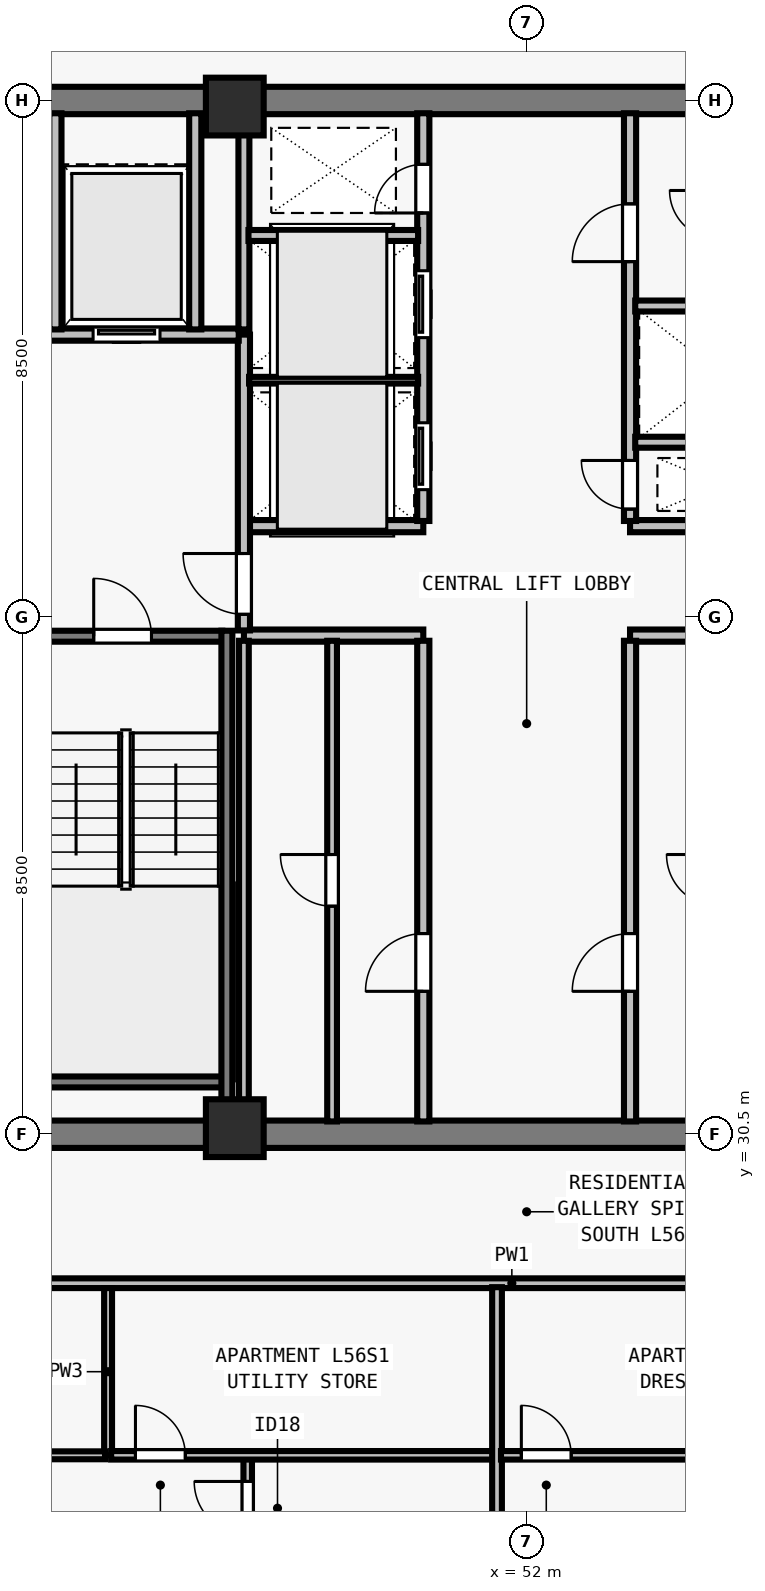
"""IFC4 building model, lengths in metres.
Left out: names, types, materials, properties, quantities, classifications, styles, units other than length and angle.
Written with IfcOpenShell. Run it as: python <this file> out.ifc"""

import sys

from ifc_helpers import new_model, si_unit, direction, frame, frame_2d, origin, origin_2d, place, context, subcontext, project, spatial, rectangle, extrude, element, fill, save


model = new_model("IFC4")
c1 = context("Model", 3, precision=1e-05, world=origin(), true_north=direction((0.0, 1.0)))
c2 = subcontext(c1, "Body", "Model", "MODEL_VIEW")
j1 = project(units=[si_unit("LENGTHUNIT", "METRE"), si_unit("PLANEANGLEUNIT", "RADIAN")], contexts=[c1])
p1 = place(None, origin())
s1 = spatial("IfcSite", under=j1, at=p1, CompositionType="ELEMENT")
p2 = place(p1, origin())
s2 = spatial("IfcBuilding", under=s1, at=p2, CompositionType="ELEMENT")
p3 = place(p2, frame((0.0, 0.0, 206.0)))
s3 = spatial("IfcBuildingStorey", under=s2, at=p3, CompositionType="ELEMENT", Elevation=206.0)
for number, where, z_axis, x_axis in (
    (1, (47.2, 30.6, 0.0), (0.0, 0.0, 1.0), (1.0, 0.0, 0.0)),
    (2, (47.2, 47.4, 0.0), (0.0, 0.0, 1.0), (1.0, 0.0, 0.0)),
):
    element("IfcColumn", number, at=place(p3, frame(where, z_axis=z_axis, x_axis=x_axis)), inside=s3, PredefinedType="COLUMN", context=c2, shape_type="SweptSolid", body=[
        extrude(rectangle(XDim=0.95, YDim=0.95, at=origin_2d()), origin(), (0.0, 0.0, 1.0), 3.5),
    ])
for number, where, z_axis, x_axis in (
    (3, (43.275, 30.5, 0.0), (0.0, 0.0, 1.0), (1.0, 0.0, 0.0)),
    (4, (43.275, 47.5, 0.0), (0.0, 0.0, 1.0), (1.0, 0.0, 0.0)),
):
    element("IfcWall", number, at=place(p3, frame(where, z_axis=z_axis, x_axis=x_axis)), inside=s3, PredefinedType="SHEAR", context=c2, shape_type="SweptSolid", body=[
        extrude(rectangle(XDim=17.45, YDim=0.45, at=frame_2d((8.725, 0.0))), origin(), (0.0, 0.0, 1.0), 3.29),
    ])
for number, where, z_axis, x_axis in (
    (5, (47.35, 38.7, 0.0), (0.0, 0.0, 1.0), (1.0, 0.0, 0.0)),
    (6, (47.35, 40.5, 0.0), (0.0, 0.0, 1.0), (1.0, 0.0, 0.0)),
    (7, (53.7, 38.7, 0.0), (0.0, 0.0, 1.0), (1.0, 0.0, 0.0)),
    (8, (53.7, 40.5, 0.0), (0.0, 0.0, 1.0), (1.0, 0.0, 0.0)),
):
    element("IfcWall", number, at=place(p3, frame(where, z_axis=z_axis, x_axis=x_axis)), inside=s3, PredefinedType="SOLIDWALL", context=c2, shape_type="SweptSolid", body=[
        extrude(rectangle(XDim=2.95, YDim=0.2, at=frame_2d((1.475, 0.0))), origin(), (0.0, 0.0, 1.0), 3.29),
    ])
p4 = place(p3, frame((50.3, 30.71, 0.0), z_axis=(0.0, 0.0, 1.0), x_axis=(0.0, 1.0, 0.0)))
e9 = element("IfcWall", 9, at=p4, inside=s3, PredefinedType="SOLIDWALL", context=c2, shape_type="SweptSolid", body=[
    extrude(rectangle(XDim=7.905, YDim=0.2, at=frame_2d((3.953, 0.0))), origin(), (0.0, 0.0, 1.0), 3.29),
])
p5 = place(p4, frame((2.14, 0.0, 0.0)))
e10 = element("IfcOpeningElement", 10, at=p5, cuts=e9, PredefinedType="OPENING", context=c2, shape_type="SweptSolid", body=[
    extrude(rectangle(XDim=0.95, YDim=2.12, at=frame_2d((0.475, 1.06))), frame((0.0, 0.11, 0.0), z_axis=(0.0, -1.0, 0.0), x_axis=(1.0, 0.0, 0.0)), (0.0, 0.0, 1.0), 0.22),
])
p6 = place(p3, frame((53.7, 30.71, 0.0), z_axis=(0.0, 0.0, 1.0), x_axis=(0.0, 1.0, 0.0)))
e11 = element("IfcWall", 11, at=p6, inside=s3, PredefinedType="SOLIDWALL", context=c2, shape_type="SweptSolid", body=[
    extrude(rectangle(XDim=7.905, YDim=0.2, at=frame_2d((3.953, 0.0))), origin(), (0.0, 0.0, 1.0), 3.29),
])
p7 = place(p6, frame((2.14, 0.0, 0.0)))
e12 = element("IfcOpeningElement", 12, at=p7, cuts=e11, PredefinedType="OPENING", context=c2, shape_type="SweptSolid", body=[
    extrude(rectangle(XDim=0.95, YDim=2.12, at=frame_2d((0.475, 1.06))), frame((0.0, 0.11, 0.0), z_axis=(0.0, -1.0, 0.0), x_axis=(1.0, 0.0, 0.0)), (0.0, 0.0, 1.0), 0.22),
])
p8 = place(p3, frame((50.3, 40.585, 0.0), z_axis=(0.0, 0.0, 1.0), x_axis=(0.0, 1.0, 0.0)))
e13 = element("IfcWall", 13, at=p8, inside=s3, PredefinedType="SOLIDWALL", context=c2, shape_type="SweptSolid", body=[
    extrude(rectangle(XDim=6.705, YDim=0.2, at=frame_2d((3.353, 0.0))), origin(), (0.0, 0.0, 1.0), 3.29),
])
p9 = place(p8, frame((0.515, 0.0, 0.0)))
e14 = element("IfcOpeningElement", 14, at=p9, cuts=e13, PredefinedType="OPENING", context=c2, shape_type="SweptSolid", body=[
    extrude(rectangle(XDim=1.1, YDim=2.2, at=frame_2d((0.55, 1.1))), frame((0.0, 0.11, 0.0), z_axis=(0.0, -1.0, 0.0), x_axis=(1.0, 0.0, 0.0)), (0.0, 0.0, 1.0), 0.22),
])
p10 = place(p8, frame((3.015, 0.0, 0.0)))
e15 = element("IfcOpeningElement", 15, at=p10, cuts=e13, PredefinedType="OPENING", context=c2, shape_type="SweptSolid", body=[
    extrude(rectangle(XDim=1.1, YDim=2.2, at=frame_2d((0.55, 1.1))), frame((0.0, 0.11, 0.0), z_axis=(0.0, -1.0, 0.0), x_axis=(1.0, 0.0, 0.0)), (0.0, 0.0, 1.0), 0.22),
])
p11 = place(p8, frame((5.065, 0.0, 0.0)))
e16 = element("IfcOpeningElement", 16, at=p11, cuts=e13, PredefinedType="OPENING", context=c2, shape_type="SweptSolid", body=[
    extrude(rectangle(XDim=0.8, YDim=2.08, at=frame_2d((0.4, 1.04))), frame((0.0, 0.11, 0.0), z_axis=(0.0, -1.0, 0.0), x_axis=(1.0, 0.0, 0.0)), (0.0, 0.0, 1.0), 0.22),
])
p12 = place(p3, frame((53.7, 40.585, 0.0), z_axis=(0.0, 0.0, 1.0), x_axis=(0.0, 1.0, 0.0)))
e17 = element("IfcWall", 17, at=p12, inside=s3, PredefinedType="SOLIDWALL", context=c2, shape_type="SweptSolid", body=[
    extrude(rectangle(XDim=6.705, YDim=0.2, at=frame_2d((3.353, 0.0))), origin(), (0.0, 0.0, 1.0), 3.29),
])
p13 = place(p12, frame((0.195, 0.0, 0.0)))
e18 = element("IfcOpeningElement", 18, at=p13, cuts=e17, PredefinedType="OPENING", context=c2, shape_type="SweptSolid", body=[
    extrude(rectangle(XDim=0.8, YDim=2.08, at=frame_2d((0.4, 1.04))), frame((0.0, 0.11, 0.0), z_axis=(0.0, -1.0, 0.0), x_axis=(1.0, 0.0, 0.0)), (0.0, 0.0, 1.0), 0.22),
])
p14 = place(p12, frame((4.265, 0.0, 0.0)))
e19 = element("IfcOpeningElement", 19, at=p14, cuts=e17, PredefinedType="OPENING", context=c2, shape_type="SweptSolid", body=[
    extrude(rectangle(XDim=0.95, YDim=2.12, at=frame_2d((0.475, 1.06))), frame((0.0, 0.11, 0.0), z_axis=(0.0, -1.0, 0.0), x_axis=(1.0, 0.0, 0.0)), (0.0, 0.0, 1.0), 0.22),
])
p15 = place(p3, frame((47.35, 38.785, 0.0), z_axis=(0.0, 0.0, 1.0), x_axis=(0.0, 1.0, 0.0)))
e20 = element("IfcWall", 20, at=p15, inside=s3, PredefinedType="SOLIDWALL", context=c2, shape_type="SweptSolid", body=[
    extrude(rectangle(XDim=4.865, YDim=0.2, at=frame_2d((2.433, 0.0))), origin(), (0.0, 0.0, 1.0), 3.29),
])
p16 = place(p15, frame((0.265, 0.0, 0.0)))
e21 = element("IfcOpeningElement", 21, at=p16, cuts=e20, PredefinedType="OPENING", context=c2, shape_type="SweptSolid", body=[
    extrude(rectangle(XDim=1.0, YDim=2.15, at=frame_2d((0.5, 1.075))), frame((0.0, 0.11, 0.0), z_axis=(0.0, -1.0, 0.0), x_axis=(1.0, 0.0, 0.0)), (0.0, 0.0, 1.0), 0.22),
])
p17 = place(p3, frame((43.71, 43.65, 0.0), z_axis=(0.0, 0.0, 1.0), x_axis=(1.0, 0.0, 0.0)))
e22 = element("IfcWall", 22, at=p17, inside=s3, PredefinedType="SOLIDWALL", context=c2, shape_type="SweptSolid", body=[
    extrude(rectangle(XDim=3.555, YDim=0.2, at=frame_2d((1.777, 0.0))), origin(), (0.0, 0.0, 1.0), 3.29),
])
p18 = place(p17, frame((1.16, 0.0, 0.0)))
e23 = element("IfcOpeningElement", 23, at=p18, cuts=e22, PredefinedType="OPENING", context=c2, shape_type="SweptSolid", body=[
    extrude(rectangle(XDim=1.1, YDim=2.2, at=frame_2d((0.55, 1.1))), frame((0.0, 0.11, 0.0), z_axis=(0.0, -1.0, 0.0), x_axis=(1.0, 0.0, 0.0)), (0.0, 0.0, 1.0), 0.22),
])
for number, where, z_axis, x_axis in (
    (24, (46.55, 43.735, 0.0), (0.0, 0.0, 1.0), (0.0, 1.0, 0.0)),
    (25, (44.25, 43.735, 0.0), (0.0, 0.0, 1.0), (0.0, 1.0, 0.0)),
):
    element("IfcWall", number, at=place(p3, frame(where, z_axis=z_axis, x_axis=x_axis)), inside=s3, PredefinedType="SOLIDWALL", context=c2, shape_type="SweptSolid", body=[
        extrude(rectangle(XDim=3.555, YDim=0.2, at=frame_2d((1.777, 0.0))), origin(), (0.0, 0.0, 1.0), 3.29),
    ])
p19 = place(p3, frame((47.35, 30.71, 0.0), z_axis=(0.0, 0.0, 1.0), x_axis=(0.0, 1.0, 0.0)))
e26 = element("IfcWall", 26, at=p19, inside=s3, PredefinedType="PARTITIONING", context=c2, shape_type="SweptSolid", body=[
    extrude(rectangle(XDim=7.905, YDim=0.16, at=frame_2d((3.953, 0.0))), origin(), (0.0, 0.0, 1.0), 3.29),
])
p20 = place(p3, frame((48.8, 30.71, 0.0), z_axis=(0.0, 0.0, 1.0), x_axis=(0.0, 1.0, 0.0)))
e27 = element("IfcWall", 27, at=p20, inside=s3, PredefinedType="PARTITIONING", context=c2, shape_type="SweptSolid", body=[
    extrude(rectangle(XDim=7.905, YDim=0.16, at=frame_2d((3.953, 0.0))), origin(), (0.0, 0.0, 1.0), 3.29),
])
p21 = place(p20, frame((3.54, 0.0, 0.0)))
e28 = element("IfcOpeningElement", 28, at=p21, cuts=e27, PredefinedType="OPENING", context=c2, shape_type="SweptSolid", body=[
    extrude(rectangle(XDim=0.85, YDim=2.12, at=frame_2d((0.425, 1.06))), frame((0.0, 0.09, 0.0), z_axis=(0.0, -1.0, 0.0), x_axis=(1.0, 0.0, 0.0)), (0.0, 0.0, 1.0), 0.18),
])
p22 = place(p3, frame((47.35, 43.735, 0.0), z_axis=(0.0, 0.0, 1.0), x_axis=(0.0, 1.0, 0.0)))
e29 = element("IfcWall", 29, at=p22, inside=s3, PredefinedType="SOLIDWALL", context=c2, shape_type="SweptSolid", body=[
    extrude(rectangle(XDim=3.555, YDim=0.18, at=frame_2d((1.777, 0.0))), origin(), (0.0, 0.0, 1.0), 3.29),
])
p23 = place(p3, frame((47.435, 42.9, 0.0), z_axis=(0.0, 0.0, 1.0), x_axis=(1.0, 0.0, 0.0)))
e30 = element("IfcWall", 30, at=p23, inside=s3, PredefinedType="PARTITIONING", context=c2, shape_type="SweptSolid", body=[
    extrude(rectangle(XDim=2.78, YDim=0.11, at=frame_2d((1.39, 0.0))), origin(), (0.0, 0.0, 1.0), 3.29),
])
p24 = place(p3, frame((47.425, 45.28, 0.0), z_axis=(0.0, 0.0, 1.0), x_axis=(1.0, 0.0, 0.0)))
e31 = element("IfcWall", 31, at=p24, inside=s3, PredefinedType="SOLIDWALL", context=c2, shape_type="SweptSolid", body=[
    extrude(rectangle(XDim=2.79, YDim=0.18, at=frame_2d((1.395, 0.0))), origin(), (0.0, 0.0, 1.0), 3.29),
])
p25 = place(p3, frame((53.785, 41.88, 0.0), z_axis=(0.0, 0.0, 1.0), x_axis=(1.0, 0.0, 0.0)))
e32 = element("IfcWall", 32, at=p25, inside=s3, PredefinedType="SOLIDWALL", context=c2, shape_type="SweptSolid", body=[
    extrude(rectangle(XDim=2.78, YDim=0.18, at=frame_2d((1.39, 0.0))), origin(), (0.0, 0.0, 1.0), 3.29),
])
p26 = place(p3, frame((53.785, 44.12, 0.0), z_axis=(0.0, 0.0, 1.0), x_axis=(1.0, 0.0, 0.0)))
e33 = element("IfcWall", 33, at=p26, inside=s3, PredefinedType="SOLIDWALL", context=c2, shape_type="SweptSolid", body=[
    extrude(rectangle(XDim=2.79, YDim=0.18, at=frame_2d((1.395, 0.0))), origin(), (0.0, 0.0, 1.0), 3.29),
])
p27 = place(p3, frame((29.805, 28.05, 0.0), z_axis=(0.0, 0.0, 1.0), x_axis=(1.0, 0.0, 0.0)))
e34 = element("IfcWall", 34, at=p27, inside=s3, PredefinedType="PARTITIONING", context=c2, shape_type="SweptSolid", body=[
    extrude(rectangle(XDim=44.39, YDim=0.16, at=frame_2d((22.195, 0.0))), origin(), (0.0, 0.0, 1.0), 2.958),
])
p28 = place(p27, frame((10.431, 0.0, 0.0)))
e35 = element("IfcOpeningElement", 35, at=p28, cuts=e34, PredefinedType="OPENING", context=c2, shape_type="SweptSolid", body=[
    extrude(rectangle(XDim=0.96, YDim=2.18, at=frame_2d((0.48, 1.09))), frame((0.0, 0.09, 0.0), z_axis=(0.0, -1.0, 0.0), x_axis=(1.0, 0.0, 0.0)), (0.0, 0.0, 1.0), 0.18),
])
p29 = place(p27, frame((32.511, 0.0, 0.0)))
e36 = element("IfcOpeningElement", 36, at=p29, cuts=e34, PredefinedType="OPENING", context=c2, shape_type="SweptSolid", body=[
    extrude(rectangle(XDim=0.96, YDim=2.18, at=frame_2d((0.48, 1.09))), frame((0.0, 0.09, 0.0), z_axis=(0.0, -1.0, 0.0), x_axis=(1.0, 0.0, 0.0)), (0.0, 0.0, 1.0), 0.18),
])
p30 = place(p3, frame((45.116, 25.22, 0.0), z_axis=(0.0, 0.0, 1.0), x_axis=(0.0, 1.0, 0.0)))
e37 = element("IfcWall", 37, at=p30, inside=s3, PredefinedType="PLUMBINGWALL", context=c2, shape_type="SweptSolid", body=[
    extrude(rectangle(XDim=2.75, YDim=0.13, at=frame_2d((1.375, 0.0))), origin(), (0.0, 0.0, 1.0), 3.29),
])
p31 = place(p3, frame((41.916, 25.22, 0.0), z_axis=(0.0, 0.0, 1.0), x_axis=(1.0, 0.0, 0.0)))
e38 = element("IfcWall", 38, at=p31, inside=s3, PredefinedType="PLUMBINGWALL", context=c2, shape_type="SweptSolid", body=[
    extrude(rectangle(XDim=3.15, YDim=0.13, at=frame_2d((1.575, 0.0))), origin(), (0.0, 0.0, 1.0), 3.29),
])
p32 = place(p3, frame((47.413, 16.88, 0.0), z_axis=(0.0, 0.0, 1.0), x_axis=(0.0, 1.0, 0.0)))
e39 = element("IfcWall", 39, at=p32, inside=s3, PredefinedType="PARTITIONING", context=c2, shape_type="SweptSolid", body=[
    extrude(rectangle(XDim=8.38, YDim=0.14, at=frame_2d((4.19, 0.0))), origin(), (0.0, 0.0, 1.0), 2.573),
])
p33 = place(p32, frame((7.03, 0.0, 0.0)))
e40 = element("IfcOpeningElement", 40, at=p33, cuts=e39, PredefinedType="OPENING", context=c2, shape_type="SweptSolid", body=[
    extrude(rectangle(XDim=0.88, YDim=2.1, at=frame_2d((0.44, 1.05))), frame((0.0, 0.08, 0.0), z_axis=(0.0, -1.0, 0.0), x_axis=(1.0, 0.0, 0.0)), (0.0, 0.0, 1.0), 0.16),
])
p34 = place(p3, frame((45.166, 25.22, 0.0), z_axis=(0.0, 0.0, 1.0), x_axis=(1.0, 0.0, 0.0)))
e41 = element("IfcWall", 41, at=p34, inside=s3, PredefinedType="PARTITIONING", context=c2, shape_type="SweptSolid", body=[
    extrude(rectangle(XDim=6.396, YDim=0.14, at=frame_2d((3.198, 0.0))), origin(), (0.0, 0.0, 1.0), 3.29),
])
p35 = place(p34, frame((0.4, 0.0, 0.0)))
e42 = element("IfcOpeningElement", 42, at=p35, cuts=e41, PredefinedType="OPENING", context=c2, shape_type="SweptSolid", body=[
    extrude(rectangle(XDim=0.82, YDim=2.1, at=frame_2d((0.41, 1.05))), frame((0.0, 0.08, 0.0), z_axis=(0.0, -1.0, 0.0), x_axis=(1.0, 0.0, 0.0)), (0.0, 0.0, 1.0), 0.16),
])
p36 = place(p3, frame((51.512, 16.805, 0.0), z_axis=(0.0, 0.0, 1.0), x_axis=(0.0, 1.0, 0.0)))
e43 = element("IfcWall", 43, at=p36, inside=s3, PredefinedType="PARTITIONING", context=c2, shape_type="SweptSolid", body=[
    extrude(rectangle(XDim=11.18, YDim=0.16, at=frame_2d((5.59, 0.0))), origin(), (0.0, 0.0, 1.0), 2.958),
])
p37 = place(p3, frame((51.577, 25.22, 0.0), z_axis=(0.0, 0.0, 1.0), x_axis=(1.0, 0.0, 0.0)))
e44 = element("IfcWall", 44, at=p37, inside=s3, PredefinedType="PARTITIONING", context=c2, shape_type="SweptSolid", body=[
    extrude(rectangle(XDim=7.069, YDim=0.14, at=frame_2d((3.534, 0.0))), origin(), (0.0, 0.0, 1.0), 3.29),
])
p38 = place(p37, frame((0.335, 0.0, 0.0)))
e45 = element("IfcOpeningElement", 45, at=p38, cuts=e44, PredefinedType="OPENING", context=c2, shape_type="SweptSolid", body=[
    extrude(rectangle(XDim=0.82, YDim=2.1, at=frame_2d((0.41, 1.05))), frame((0.0, 0.08, 0.0), z_axis=(0.0, -1.0, 0.0), x_axis=(1.0, 0.0, 0.0)), (0.0, 0.0, 1.0), 0.16),
])
p39 = place(p3, frame((43.715, 38.69, 0.0), z_axis=(0.0, 0.0, 1.0), x_axis=(1.0, 0.0, 0.0)))
e46 = element("IfcWall", 46, at=p39, inside=s3, PredefinedType="SOLIDWALL", context=c2, shape_type="SweptSolid", body=[
    extrude(rectangle(XDim=3.28, YDim=0.18, at=frame_2d((1.64, 0.0))), origin(), (0.0, 0.0, 1.0), 3.29),
])
p40 = place(p39, frame((1.165, 0.0, 0.0)))
e47 = element("IfcOpeningElement", 47, at=p40, cuts=e46, PredefinedType="OPENING", context=c2, shape_type="SweptSolid", body=[
    extrude(rectangle(XDim=0.95, YDim=2.15, at=frame_2d((0.475, 1.075))), frame((0.0, 0.1, 0.0), z_axis=(0.0, -1.0, 0.0), x_axis=(1.0, 0.0, 0.0)), (0.0, 0.0, 1.0), 0.2),
])
p41 = place(p3, frame((43.715, 31.36, 0.0), z_axis=(0.0, 0.0, 1.0), x_axis=(1.0, 0.0, 0.0)))
e48 = element("IfcWall", 48, at=p41, inside=s3, PredefinedType="SOLIDWALL", context=c2, shape_type="SweptSolid", body=[
    extrude(rectangle(XDim=3.28, YDim=0.18, at=frame_2d((1.64, 0.0))), origin(), (0.0, 0.0, 1.0), 3.29),
])
p42 = place(p3, frame((47.07, 38.78, 0.0), z_axis=(0.0, 0.0, 1.0), x_axis=(0.0, -1.0, 0.0)))
e49 = element("IfcWall", 49, at=p42, inside=s3, PredefinedType="SOLIDWALL", context=c2, shape_type="SweptSolid", body=[
    extrude(rectangle(XDim=8.067, YDim=0.18, at=frame_2d((4.034, 0.0))), origin(), (0.0, 0.0, 1.0), 3.29),
])
p43 = place(p16, origin())
e50 = element("IfcDoor", 50, at=p43, inside=s3, OperationType="SINGLE_SWING_RIGHT", PredefinedType="DOOR", context=c2, shape_type="SweptSolid", body=[
    extrude(rectangle(XDim=1.0, YDim=2.15, at=frame_2d((0.5, 1.075))), frame((0.0, 0.025, 0.0), z_axis=(0.0, -1.0, 0.0), x_axis=(1.0, 0.0, 0.0)), (0.0, 0.0, 1.0), 0.05),
])
fill(e21, e50)
p44 = place(p18, origin())
e51 = element("IfcDoor", 51, at=p44, inside=s3, OperationType="SLIDING_TO_LEFT", PredefinedType="DOOR", context=c2, shape_type="SweptSolid", body=[
    extrude(rectangle(XDim=1.1, YDim=2.2, at=frame_2d((0.55, 1.1))), frame((0.0, 0.025, 0.0), z_axis=(0.0, -1.0, 0.0), x_axis=(1.0, 0.0, 0.0)), (0.0, 0.0, 1.0), 0.05),
])
fill(e23, e51)
p45 = place(p5, origin())
e52 = element("IfcDoor", 52, at=p45, inside=s3, OperationType="SINGLE_SWING_LEFT", PredefinedType="DOOR", context=c2, shape_type="SweptSolid", body=[
    extrude(rectangle(XDim=0.95, YDim=2.12, at=frame_2d((0.475, 1.06))), frame((0.0, 0.025, 0.0), z_axis=(0.0, -1.0, 0.0), x_axis=(1.0, 0.0, 0.0)), (0.0, 0.0, 1.0), 0.05),
])
fill(e10, e52)
p46 = place(p21, origin())
e53 = element("IfcDoor", 53, at=p46, inside=s3, OperationType="SINGLE_SWING_RIGHT", PredefinedType="DOOR", context=c2, shape_type="SweptSolid", body=[
    extrude(rectangle(XDim=0.85, YDim=2.12, at=frame_2d((0.425, 1.06))), frame((0.0, 0.025, 0.0), z_axis=(0.0, -1.0, 0.0), x_axis=(1.0, 0.0, 0.0)), (0.0, 0.0, 1.0), 0.05),
])
fill(e28, e53)
p47 = place(p7, origin())
e54 = element("IfcDoor", 54, at=p47, inside=s3, OperationType="SINGLE_SWING_LEFT", PredefinedType="DOOR", context=c2, shape_type="SweptSolid", body=[
    extrude(rectangle(XDim=0.95, YDim=2.12, at=frame_2d((0.475, 1.06))), frame((0.0, 0.025, 0.0), z_axis=(0.0, -1.0, 0.0), x_axis=(1.0, 0.0, 0.0)), (0.0, 0.0, 1.0), 0.05),
])
fill(e12, e54)
p48 = place(p9, origin())
e55 = element("IfcDoor", 55, at=p48, inside=s3, OperationType="SLIDING_TO_LEFT", PredefinedType="DOOR", context=c2, shape_type="SweptSolid", body=[
    extrude(rectangle(XDim=1.1, YDim=2.2, at=frame_2d((0.55, 1.1))), frame((0.0, 0.025, 0.0), z_axis=(0.0, -1.0, 0.0), x_axis=(1.0, 0.0, 0.0)), (0.0, 0.0, 1.0), 0.05),
])
fill(e14, e55)
p49 = place(p10, origin())
e56 = element("IfcDoor", 56, at=p49, inside=s3, OperationType="SLIDING_TO_LEFT", PredefinedType="DOOR", context=c2, shape_type="SweptSolid", body=[
    extrude(rectangle(XDim=1.1, YDim=2.2, at=frame_2d((0.55, 1.1))), frame((0.0, 0.025, 0.0), z_axis=(0.0, -1.0, 0.0), x_axis=(1.0, 0.0, 0.0)), (0.0, 0.0, 1.0), 0.05),
])
fill(e15, e56)
p50 = place(p11, origin())
e57 = element("IfcDoor", 57, at=p50, inside=s3, OperationType="SINGLE_SWING_LEFT", PredefinedType="DOOR", context=c2, shape_type="SweptSolid", body=[
    extrude(rectangle(XDim=0.8, YDim=2.08, at=frame_2d((0.4, 1.04))), frame((0.0, 0.025, 0.0), z_axis=(0.0, -1.0, 0.0), x_axis=(1.0, 0.0, 0.0)), (0.0, 0.0, 1.0), 0.05),
])
fill(e16, e57)
p51 = place(p13, origin())
e58 = element("IfcDoor", 58, at=p51, inside=s3, OperationType="SINGLE_SWING_RIGHT", PredefinedType="DOOR", context=c2, shape_type="SweptSolid", body=[
    extrude(rectangle(XDim=0.8, YDim=2.08, at=frame_2d((0.4, 1.04))), frame((0.0, 0.025, 0.0), z_axis=(0.0, -1.0, 0.0), x_axis=(1.0, 0.0, 0.0)), (0.0, 0.0, 1.0), 0.05),
])
fill(e18, e58)
p52 = place(p14, origin())
e59 = element("IfcDoor", 59, at=p52, inside=s3, OperationType="SINGLE_SWING_LEFT", PredefinedType="DOOR", context=c2, shape_type="SweptSolid", body=[
    extrude(rectangle(XDim=0.95, YDim=2.12, at=frame_2d((0.475, 1.06))), frame((0.0, 0.025, 0.0), z_axis=(0.0, -1.0, 0.0), x_axis=(1.0, 0.0, 0.0)), (0.0, 0.0, 1.0), 0.05),
])
fill(e19, e59)
p53 = place(p35, origin())
e60 = element("IfcDoor", 60, at=p53, inside=s3, OperationType="SINGLE_SWING_LEFT", PredefinedType="DOOR", context=c2, shape_type="SweptSolid", body=[
    extrude(rectangle(XDim=0.82, YDim=2.1, at=frame_2d((0.41, 1.05))), frame((0.0, 0.025, 0.0), z_axis=(0.0, -1.0, 0.0), x_axis=(1.0, 0.0, 0.0)), (0.0, 0.0, 1.0), 0.05),
])
fill(e42, e60)
p54 = place(p33, origin())
e61 = element("IfcDoor", 61, at=p54, inside=s3, OperationType="SINGLE_SWING_RIGHT", PredefinedType="DOOR", context=c2, shape_type="SweptSolid", body=[
    extrude(rectangle(XDim=0.88, YDim=2.1, at=frame_2d((0.44, 1.05))), frame((0.0, 0.025, 0.0), z_axis=(0.0, -1.0, 0.0), x_axis=(1.0, 0.0, 0.0)), (0.0, 0.0, 1.0), 0.05),
])
fill(e40, e61)
p55 = place(p38, origin())
e62 = element("IfcDoor", 62, at=p55, inside=s3, OperationType="SINGLE_SWING_LEFT", PredefinedType="DOOR", context=c2, shape_type="SweptSolid", body=[
    extrude(rectangle(XDim=0.82, YDim=2.1, at=frame_2d((0.41, 1.05))), frame((0.0, 0.025, 0.0), z_axis=(0.0, -1.0, 0.0), x_axis=(1.0, 0.0, 0.0)), (0.0, 0.0, 1.0), 0.05),
])
fill(e45, e62)
p56 = place(p40, origin())
e63 = element("IfcDoor", 63, at=p56, inside=s3, OperationType="SINGLE_SWING_LEFT", PredefinedType="DOOR", context=c2, shape_type="SweptSolid", body=[
    extrude(rectangle(XDim=0.95, YDim=2.15, at=frame_2d((0.475, 1.075))), frame((0.0, 0.025, 0.0), z_axis=(0.0, -1.0, 0.0), x_axis=(1.0, 0.0, 0.0)), (0.0, 0.0, 1.0), 0.05),
])
fill(e47, e63)
save(model, sys.argv[1])
